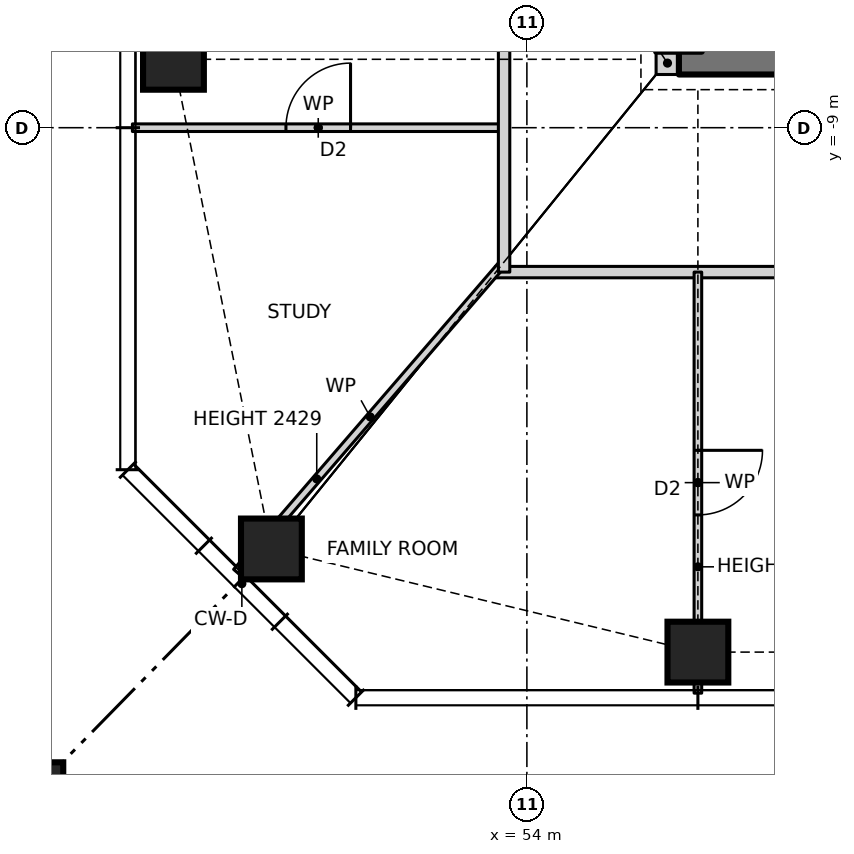
"""IFC4 building model, lengths in metres.
Left out: names, types, materials, properties, quantities, classifications, styles, units other than length and angle.
Written with IfcOpenShell. Run it as: python <this file> out.ifc"""

import sys

from ifc_helpers import new_model, si_unit, direction, frame, frame_2d, origin, origin_2d, place, context, subcontext, project, spatial, rectangle, hollow_rectangle, extrude, element, fill, save


model = new_model("IFC4")
c1 = context("Model", 3, precision=1e-05, world=origin(), true_north=direction((0.0, 1.0)))
c2 = subcontext(c1, "Body", "Model", "MODEL_VIEW")
j1 = project(units=[si_unit("LENGTHUNIT", "METRE"), si_unit("PLANEANGLEUNIT", "RADIAN")], contexts=[c1])
p1 = place(None, origin())
s1 = spatial("IfcSite", under=j1, at=p1, CompositionType="ELEMENT")
p2 = place(p1, origin())
s2 = spatial("IfcBuilding", under=s1, at=p2, CompositionType="ELEMENT")
p3 = place(p2, frame((0.0, 0.0, 122.5)))
s3 = spatial("IfcBuildingStorey", under=s2, at=p3, CompositionType="ELEMENT", Elevation=122.5)
for number, where, z_axis, x_axis in (
    (1, (50.639, -14.543, 0.0), (0.0, 0.0, 1.0), (1.0, 0.0, 0.0)),
    (2, (56.25, -15.9, 0.0), (0.0, 0.0, 1.0), (1.0, 0.0, 0.0)),
    (3, (49.35, -8.1, 0.0), (0.0, 0.0, 1.0), (1.0, 0.0, 0.0)),
):
    element("IfcColumn", number, at=place(p3, frame(where, z_axis=z_axis, x_axis=x_axis)), inside=s3, PredefinedType="COLUMN", context=c2, shape_type="SweptSolid", body=[
        extrude(hollow_rectangle(XDim=0.8, YDim=0.8, WallThickness=0.1, at=origin_2d()), origin(), (0.0, 0.0, 1.0), 3.5),
    ])
p4 = place(p3, frame((47.35, -17.9, 0.0), z_axis=(0.0, 0.0, 1.0), x_axis=(1.0, 0.0, 0.0)))
e4 = element("IfcColumn", 4, at=p4, inside=s3, PredefinedType="COLUMN", context=c2, shape_type="SweptSolid", body=[
    extrude(hollow_rectangle(XDim=1.1, YDim=1.1, WallThickness=0.06, at=origin_2d()), origin(), (0.0, 0.0, 1.0), 3.5),
])
p5 = place(p3, frame((55.7, -8.15, 0.0), z_axis=(0.0, 0.0, 1.0), x_axis=(1.0, 0.0, 0.0)))
e5 = element("IfcWall", 5, at=p5, inside=s3, PredefinedType="SOLIDWALL", context=c2, shape_type="SweptSolid", body=[
    extrude(rectangle(XDim=0.3, YDim=0.3, at=frame_2d((0.15, 0.0))), origin(), (0.0, 0.0, 1.0), 3.5),
])
p6 = place(p3, frame((56.0, -8.0, 0.0), z_axis=(0.0, 0.0, 1.0), x_axis=(1.0, 0.0, 0.0)))
e6 = element("IfcWall", 6, at=p6, inside=s3, PredefinedType="SHEAR", context=c2, shape_type="SweptSolid", body=[
    extrude(rectangle(XDim=14.0, YDim=0.6, at=frame_2d((7.0, 0.0))), origin(), (0.0, 0.0, 1.0), 3.5),
])
p7 = place(p6, frame((2.7, 0.0, 0.0)))
e7 = element("IfcOpeningElement", 7, at=p7, cuts=e6, PredefinedType="OPENING", context=c2, shape_type="SweptSolid", body=[
    extrude(rectangle(XDim=0.9, YDim=2.1, at=frame_2d((0.45, 1.05))), frame((0.0, 0.31, 0.0), z_axis=(0.0, -1.0, 0.0), x_axis=(1.0, 0.0, 0.0)), (0.0, 0.0, 1.0), 0.62),
])
p8 = place(p6, frame((7.7, 0.0, 0.0)))
e8 = element("IfcOpeningElement", 8, at=p8, cuts=e6, PredefinedType="OPENING", context=c2, shape_type="SweptSolid", body=[
    extrude(rectangle(XDim=0.9, YDim=2.1, at=frame_2d((0.45, 1.05))), frame((0.0, 0.31, 0.0), z_axis=(0.0, -1.0, 0.0), x_axis=(1.0, 0.0, 0.0)), (0.0, 0.0, 1.0), 0.62),
])
p9 = place(p3, frame((53.586, -10.9, 0.0), z_axis=(0.0, 0.0, 1.0), x_axis=(1.0, 0.0, 0.0)))
e9 = element("IfcWall", 9, at=p9, inside=s3, PredefinedType="PARTITIONING", context=c2, shape_type="SweptSolid", body=[
    extrude(rectangle(XDim=18.828, YDim=0.15, at=frame_2d((9.414, 0.0))), origin(), (0.0, 0.0, 1.0), 3.27),
])
p10 = place(p9, frame((8.914, 0.0, 0.0)))
e10 = element("IfcOpeningElement", 10, at=p10, cuts=e9, PredefinedType="OPENING", context=c2, shape_type="SweptSolid", body=[
    extrude(rectangle(XDim=1.0, YDim=2.1, at=frame_2d((0.5, 1.05))), frame((0.0, 0.085, 0.0), z_axis=(0.0, -1.0, 0.0), x_axis=(1.0, 0.0, 0.0)), (0.0, 0.0, 1.0), 0.17),
])
p11 = place(p3, frame((48.81, -9.0, 0.0), z_axis=(0.0, 0.0, 1.0), x_axis=(1.0, 0.0, 0.0)))
e11 = element("IfcWall", 11, at=p11, inside=s3, PredefinedType="PARTITIONING", context=c2, shape_type="SweptSolid", body=[
    extrude(rectangle(XDim=4.89, YDim=0.1, at=frame_2d((2.445, 0.0))), origin(), (0.0, 0.0, 1.0), 3.27),
])
p12 = place(p11, frame((2.02, 0.0, 0.0)))
e12 = element("IfcOpeningElement", 12, at=p12, cuts=e11, PredefinedType="OPENING", context=c2, shape_type="SweptSolid", body=[
    extrude(rectangle(XDim=0.85, YDim=2.1, at=frame_2d((0.425, 1.05))), frame((0.0, 0.06, 0.0), z_axis=(0.0, -1.0, 0.0), x_axis=(1.0, 0.0, 0.0)), (0.0, 0.0, 1.0), 0.12),
])
p13 = place(p3, frame((50.179, -14.844, 0.0), z_axis=(0.0, 0.0, 1.0), x_axis=(0.653713095188, 0.756742485381, 0.0)))
e13 = element("IfcWall", 13, at=p13, inside=s3, PredefinedType="PARTITIONING", context=c2, shape_type="SweptSolid", body=[
    extrude(rectangle(XDim=5.386, YDim=0.1, at=frame_2d((2.693, 0.0))), origin(), (0.0, 0.0, 1.0), 2.429),
])
p14 = place(p3, frame((56.25, -16.44, 0.0), z_axis=(0.0, 0.0, 1.0), x_axis=(0.0, 1.0, 0.0)))
e14 = element("IfcWall", 14, at=p14, inside=s3, PredefinedType="PARTITIONING", context=c2, shape_type="SweptSolid", body=[
    extrude(rectangle(XDim=5.54, YDim=0.1, at=frame_2d((2.77, 0.0))), origin(), (0.0, 0.0, 1.0), 2.587),
])
p15 = place(p14, frame((2.345, 0.0, 0.0)))
e15 = element("IfcOpeningElement", 15, at=p15, cuts=e14, PredefinedType="OPENING", context=c2, shape_type="SweptSolid", body=[
    extrude(rectangle(XDim=0.85, YDim=2.1, at=frame_2d((0.425, 1.05))), frame((0.0, 0.06, 0.0), z_axis=(0.0, -1.0, 0.0), x_axis=(1.0, 0.0, 0.0)), (0.0, 0.0, 1.0), 0.12),
])
p16 = place(p3, frame((53.7, -10.9, 0.0), z_axis=(0.0, 0.0, 1.0), x_axis=(0.0, 1.0, 0.0)))
e16 = element("IfcWall", 16, at=p16, inside=s3, PredefinedType="PARTITIONING", context=c2, shape_type="SweptSolid", body=[
    extrude(rectangle(XDim=21.668, YDim=0.15, at=frame_2d((10.834, 0.0))), origin(), (0.0, 0.0, 1.0), 3.27),
])
p17 = place(p16, frame((10.4, 0.0, 0.0)))
e17 = element("IfcOpeningElement", 17, at=p17, cuts=e16, PredefinedType="OPENING", context=c2, shape_type="SweptSolid", body=[
    extrude(rectangle(XDim=1.0, YDim=2.1, at=frame_2d((0.5, 1.05))), frame((0.0, 0.085, 0.0), z_axis=(0.0, -1.0, 0.0), x_axis=(1.0, 0.0, 0.0)), (0.0, 0.0, 1.0), 0.17),
])
p18 = place(p15, frame((0.85, 0.0, 0.0), z_axis=(0.0, 0.0, 1.0), x_axis=(-1.0, 0.0, 0.0)))
e18 = element("IfcDoor", 18, at=p18, inside=s3, OperationType="SINGLE_SWING_LEFT", PredefinedType="DOOR", context=c2, shape_type="SweptSolid", body=[
    extrude(rectangle(XDim=0.85, YDim=2.1, at=frame_2d((0.425, 1.05))), frame((0.0, 0.025, 0.0), z_axis=(0.0, -1.0, 0.0), x_axis=(1.0, 0.0, 0.0)), (0.0, 0.0, 1.0), 0.05),
])
fill(e15, e18)
p19 = place(p12, origin())
e19 = element("IfcDoor", 19, at=p19, inside=s3, OperationType="SINGLE_SWING_RIGHT", PredefinedType="DOOR", context=c2, shape_type="SweptSolid", body=[
    extrude(rectangle(XDim=0.85, YDim=2.1, at=frame_2d((0.425, 1.05))), frame((0.0, 0.025, 0.0), z_axis=(0.0, -1.0, 0.0), x_axis=(1.0, 0.0, 0.0)), (0.0, 0.0, 1.0), 0.05),
])
fill(e12, e19)
save(model, sys.argv[1])
